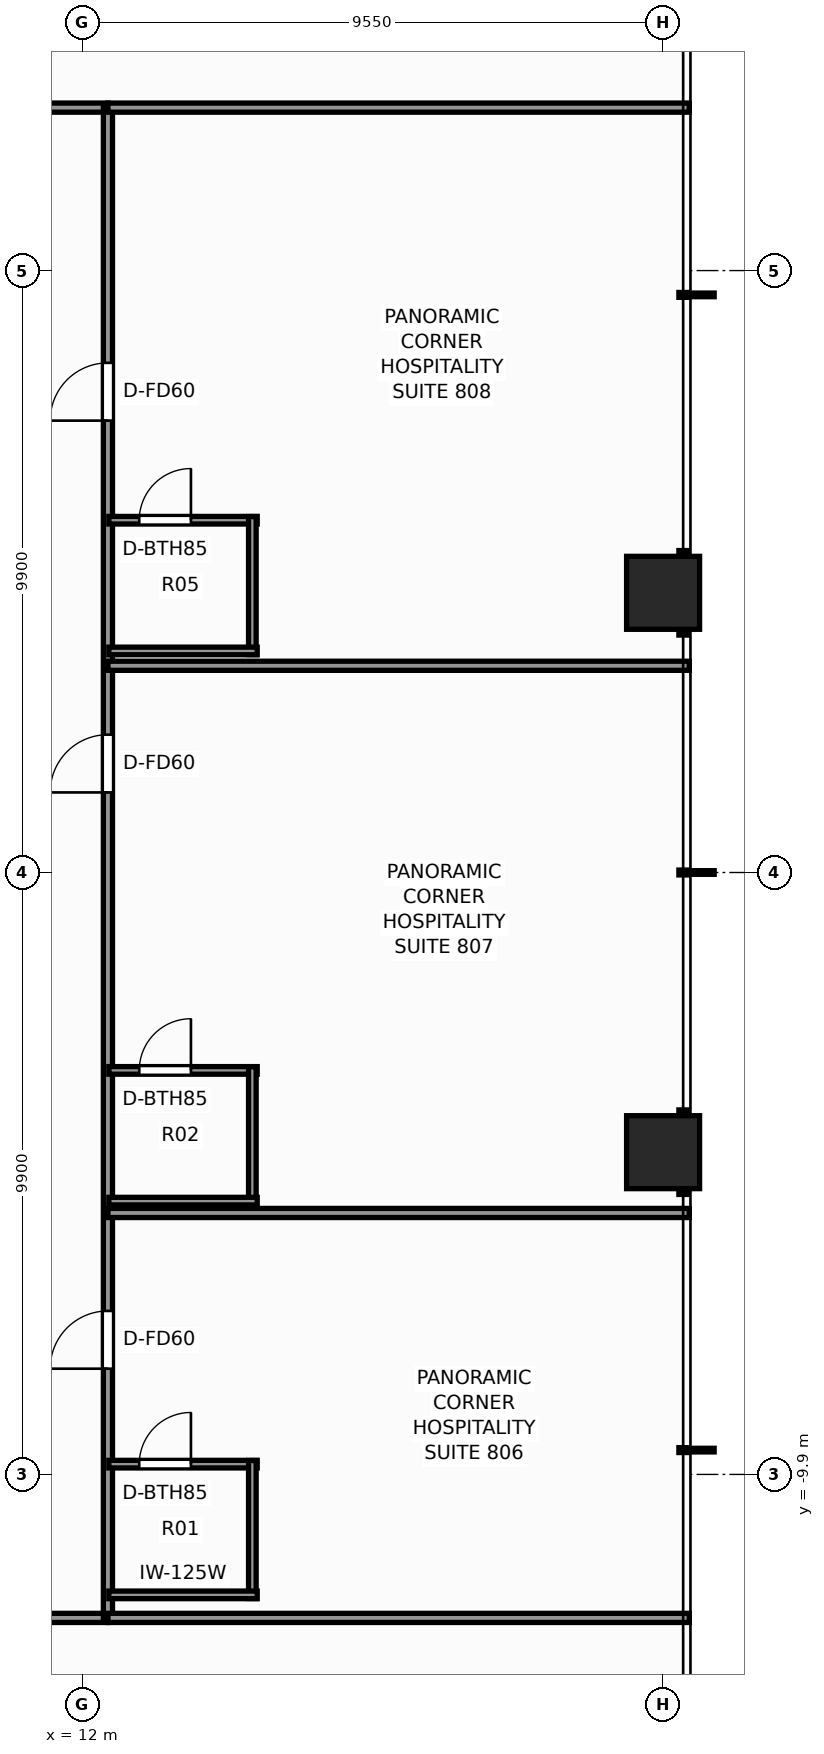
"""IFC4 building model, lengths in metres.
Left out: names, types, materials, properties, quantities, classifications, styles, units other than length and angle.
Written with IfcOpenShell. Run it as: python <this file> out.ifc"""

import sys

from ifc_helpers import new_model, si_unit, direction, frame, frame_2d, origin, origin_2d, place, context, subcontext, project, spatial, rectangle, extrude, element, fill, save


model = new_model("IFC4")
c1 = context("Model", 3, precision=1e-05, world=origin(), true_north=direction((0.0, 1.0)))
c2 = subcontext(c1, "Body", "Model", "MODEL_VIEW")
j1 = project(units=[si_unit("LENGTHUNIT", "METRE"), si_unit("PLANEANGLEUNIT", "RADIAN")], contexts=[c1])
p1 = place(None, origin())
s1 = spatial("IfcSite", under=j1, at=p1, CompositionType="ELEMENT")
p2 = place(p1, origin())
s2 = spatial("IfcBuilding", under=s1, at=p2, CompositionType="ELEMENT")
p3 = place(p2, frame((0.0, 0.0, 30.4)))
s3 = spatial("IfcBuildingStorey", under=s2, at=p3, CompositionType="ELEMENT", Elevation=30.4)
for number, where, z_axis, x_axis in (
    (1, (21.55, -4.6, 0.0), (0.0, 0.0, 1.0), (1.0, 0.0, 0.0)),
    (2, (21.55, 4.6, 0.0), (0.0, 0.0, 1.0), (1.0, 0.0, 0.0)),
):
    element("IfcColumn", number, at=place(p3, frame(where, z_axis=z_axis, x_axis=x_axis)), inside=s3, PredefinedType="COLUMN", context=c2, shape_type="SweptSolid", body=[
        extrude(rectangle(XDim=1.2, YDim=1.2, at=origin_2d()), origin(), (0.0, 0.0, 1.0), 3.3),
    ])
p4 = place(p3, frame((-12.26, -12.26, 0.0), z_axis=(0.0, 0.0, 1.0), x_axis=(1.0, 0.0, 0.0)))
e3 = element("IfcWall", 3, at=p4, inside=s3, PredefinedType="PARTITIONING", context=c2, shape_type="SweptSolid", body=[
    extrude(rectangle(XDim=24.68, YDim=0.15, at=frame_2d((12.34, 0.0))), origin(), (0.0, 0.0, 1.0), 2.272),
])
p5 = place(p4, frame((3.444, 0.0, 0.0)))
e4 = element("IfcOpeningElement", 4, at=p5, cuts=e3, PredefinedType="OPENING", context=c2, shape_type="SweptSolid", body=[
    extrude(rectangle(XDim=0.9, YDim=2.06, at=frame_2d((0.45, 1.03))), frame((0.0, 0.085, 0.0), z_axis=(0.0, -1.0, 0.0), x_axis=(1.0, 0.0, 0.0)), (0.0, 0.0, 1.0), 0.17),
])
p6 = place(p4, frame((5.779, 0.0, 0.0)))
e5 = element("IfcOpeningElement", 5, at=p6, cuts=e3, PredefinedType="OPENING", context=c2, shape_type="SweptSolid", body=[
    extrude(rectangle(XDim=0.9, YDim=2.06, at=frame_2d((0.45, 1.03))), frame((0.0, 0.085, 0.0), z_axis=(0.0, -1.0, 0.0), x_axis=(1.0, 0.0, 0.0)), (0.0, 0.0, 1.0), 0.17),
])
p7 = place(p4, frame((13.551, 0.0, 0.0)))
e6 = element("IfcOpeningElement", 6, at=p7, cuts=e3, PredefinedType="OPENING", context=c2, shape_type="SweptSolid", body=[
    extrude(rectangle(XDim=0.9, YDim=2.06, at=frame_2d((0.45, 1.03))), frame((0.0, 0.085, 0.0), z_axis=(0.0, -1.0, 0.0), x_axis=(1.0, 0.0, 0.0)), (0.0, 0.0, 1.0), 0.17),
])
p8 = place(p4, frame((17.921, 0.0, 0.0)))
e7 = element("IfcOpeningElement", 7, at=p8, cuts=e3, PredefinedType="OPENING", context=c2, shape_type="SweptSolid", body=[
    extrude(rectangle(XDim=0.9, YDim=2.06, at=frame_2d((0.45, 1.03))), frame((0.0, 0.085, 0.0), z_axis=(0.0, -1.0, 0.0), x_axis=(1.0, 0.0, 0.0)), (0.0, 0.0, 1.0), 0.17),
])
p9 = place(p4, frame((20.256, 0.0, 0.0)))
e8 = element("IfcOpeningElement", 8, at=p9, cuts=e3, PredefinedType="OPENING", context=c2, shape_type="SweptSolid", body=[
    extrude(rectangle(XDim=0.9, YDim=2.06, at=frame_2d((0.45, 1.03))), frame((0.0, 0.085, 0.0), z_axis=(0.0, -1.0, 0.0), x_axis=(1.0, 0.0, 0.0)), (0.0, 0.0, 1.0), 0.17),
])
p10 = place(p3, frame((-12.26, 12.58, 0.0), z_axis=(0.0, 0.0, 1.0), x_axis=(1.0, 0.0, 0.0)))
e9 = element("IfcWall", 9, at=p10, inside=s3, PredefinedType="PARTITIONING", context=c2, shape_type="SweptSolid", body=[
    extrude(rectangle(XDim=24.68, YDim=0.15, at=frame_2d((12.34, 0.0))), origin(), (0.0, 0.0, 1.0), 2.272),
])
p11 = place(p10, frame((3.444, 0.0, 0.0)))
e10 = element("IfcOpeningElement", 10, at=p11, cuts=e9, PredefinedType="OPENING", context=c2, shape_type="SweptSolid", body=[
    extrude(rectangle(XDim=0.9, YDim=2.06, at=frame_2d((0.45, 1.03))), frame((0.0, 0.085, 0.0), z_axis=(0.0, -1.0, 0.0), x_axis=(1.0, 0.0, 0.0)), (0.0, 0.0, 1.0), 0.17),
])
p12 = place(p10, frame((9.78, 0.0, 0.0)))
e11 = element("IfcOpeningElement", 11, at=p12, cuts=e9, PredefinedType="OPENING", context=c2, shape_type="SweptSolid", body=[
    extrude(rectangle(XDim=0.9, YDim=2.06, at=frame_2d((0.45, 1.03))), frame((0.0, 0.085, 0.0), z_axis=(0.0, -1.0, 0.0), x_axis=(1.0, 0.0, 0.0)), (0.0, 0.0, 1.0), 0.17),
])
p13 = place(p10, frame((19.345, 0.0, 0.0)))
e12 = element("IfcOpeningElement", 12, at=p13, cuts=e9, PredefinedType="OPENING", context=c2, shape_type="SweptSolid", body=[
    extrude(rectangle(XDim=0.9, YDim=2.06, at=frame_2d((0.45, 1.03))), frame((0.0, 0.085, 0.0), z_axis=(0.0, -1.0, 0.0), x_axis=(1.0, 0.0, 0.0)), (0.0, 0.0, 1.0), 0.17),
])
p14 = place(p3, frame((12.42, -12.26, 0.0), z_axis=(0.0, 0.0, 1.0), x_axis=(0.0, 1.0, 0.0)))
e13 = element("IfcWall", 13, at=p14, inside=s3, PredefinedType="PARTITIONING", context=c2, shape_type="SweptSolid", body=[
    extrude(rectangle(XDim=24.84, YDim=0.15, at=frame_2d((12.42, 0.0))), origin(), (0.0, 0.0, 1.0), 2.272),
])
p15 = place(p14, frame((4.099, 0.0, 0.0)))
e14 = element("IfcOpeningElement", 14, at=p15, cuts=e13, PredefinedType="OPENING", context=c2, shape_type="SweptSolid", body=[
    extrude(rectangle(XDim=0.95, YDim=2.06, at=frame_2d((0.475, 1.03))), frame((0.0, 0.085, 0.0), z_axis=(0.0, -1.0, 0.0), x_axis=(1.0, 0.0, 0.0)), (0.0, 0.0, 1.0), 0.17),
])
p16 = place(p14, frame((13.577, 0.0, 0.0)))
e15 = element("IfcOpeningElement", 15, at=p16, cuts=e13, PredefinedType="OPENING", context=c2, shape_type="SweptSolid", body=[
    extrude(rectangle(XDim=0.95, YDim=2.06, at=frame_2d((0.475, 1.03))), frame((0.0, 0.085, 0.0), z_axis=(0.0, -1.0, 0.0), x_axis=(1.0, 0.0, 0.0)), (0.0, 0.0, 1.0), 0.17),
])
p17 = place(p14, frame((19.692, 0.0, 0.0)))
e16 = element("IfcOpeningElement", 16, at=p17, cuts=e13, PredefinedType="OPENING", context=c2, shape_type="SweptSolid", body=[
    extrude(rectangle(XDim=0.95, YDim=2.06, at=frame_2d((0.475, 1.03))), frame((0.0, 0.085, 0.0), z_axis=(0.0, -1.0, 0.0), x_axis=(1.0, 0.0, 0.0)), (0.0, 0.0, 1.0), 0.17),
])
for number, where, z_axis, x_axis in (
    (17, (12.42, -12.26, 0.0), (0.0, 0.0, 1.0), (1.0, 0.0, 0.0)),
    (18, (12.42, 12.58, 0.0), (0.0, 0.0, 1.0), (1.0, 0.0, 0.0)),
):
    element("IfcWall", number, at=place(p3, frame(where, z_axis=z_axis, x_axis=x_axis)), inside=s3, PredefinedType="PARTITIONING", context=c2, shape_type="SweptSolid", body=[
        extrude(rectangle(XDim=9.56, YDim=0.15, at=frame_2d((4.78, 0.0))), origin(), (0.0, 0.0, 1.0), 2.272),
    ])
p18 = place(p3, frame((12.42, -5.6, 0.0), z_axis=(0.0, 0.0, 1.0), x_axis=(1.0, 0.0, 0.0)))
e19 = element("IfcWall", 19, at=p18, inside=s3, PredefinedType="PARTITIONING", context=c2, shape_type="SweptSolid", body=[
    extrude(rectangle(XDim=9.56, YDim=0.15, at=frame_2d((4.78, 0.0))), origin(), (0.0, 0.0, 1.0), 2.429),
])
p19 = place(p3, frame((12.435, -9.731, 0.0), z_axis=(0.0, 0.0, 1.0), x_axis=(1.0, 0.0, 0.0)))
e20 = element("IfcWall", 20, at=p19, inside=s3, PredefinedType="PARTITIONING", context=c2, shape_type="SweptSolid", body=[
    extrude(rectangle(XDim=2.44, YDim=0.125, at=frame_2d((1.22, 0.0))), origin(), (0.0, 0.0, 1.0), 3.06),
])
p20 = place(p19, frame((0.5, 0.0, 0.0)))
e21 = element("IfcOpeningElement", 21, at=p20, cuts=e20, PredefinedType="OPENING", context=c2, shape_type="SweptSolid", body=[
    extrude(rectangle(XDim=0.85, YDim=2.03, at=frame_2d((0.425, 1.015))), frame((0.0, 0.073, 0.0), z_axis=(0.0, -1.0, 0.0), x_axis=(1.0, 0.0, 0.0)), (0.0, 0.0, 1.0), 0.145),
])
p21 = place(p3, frame((14.795, -11.941, 0.0), z_axis=(0.0, 0.0, 1.0), x_axis=(0.0, 1.0, 0.0)))
e22 = element("IfcWall", 22, at=p21, inside=s3, PredefinedType="PARTITIONING", context=c2, shape_type="SweptSolid", body=[
    extrude(rectangle(XDim=2.27, YDim=0.125, at=frame_2d((1.135, 0.0))), origin(), (0.0, 0.0, 1.0), 2.272),
])
p22 = place(p3, frame((12.435, -11.881, 0.0), z_axis=(0.0, 0.0, 1.0), x_axis=(1.0, 0.0, 0.0)))
e23 = element("IfcWall", 23, at=p22, inside=s3, PredefinedType="PARTITIONING", context=c2, shape_type="SweptSolid", body=[
    extrude(rectangle(XDim=2.44, YDim=0.125, at=frame_2d((1.22, 0.0))), origin(), (0.0, 0.0, 1.0), 2.272),
])
p23 = place(p3, frame((12.42, 3.4, 0.0), z_axis=(0.0, 0.0, 1.0), x_axis=(1.0, 0.0, 0.0)))
e24 = element("IfcWall", 24, at=p23, inside=s3, PredefinedType="PARTITIONING", context=c2, shape_type="SweptSolid", body=[
    extrude(rectangle(XDim=9.56, YDim=0.15, at=frame_2d((4.78, 0.0))), origin(), (0.0, 0.0, 1.0), 2.429),
])
p24 = place(p3, frame((12.435, -3.255, 0.0), z_axis=(0.0, 0.0, 1.0), x_axis=(1.0, 0.0, 0.0)))
e25 = element("IfcWall", 25, at=p24, inside=s3, PredefinedType="PARTITIONING", context=c2, shape_type="SweptSolid", body=[
    extrude(rectangle(XDim=2.44, YDim=0.125, at=frame_2d((1.22, 0.0))), origin(), (0.0, 0.0, 1.0), 2.349),
])
p25 = place(p24, frame((0.5, 0.0, 0.0)))
e26 = element("IfcOpeningElement", 26, at=p25, cuts=e25, PredefinedType="OPENING", context=c2, shape_type="SweptSolid", body=[
    extrude(rectangle(XDim=0.85, YDim=2.03, at=frame_2d((0.425, 1.015))), frame((0.0, 0.073, 0.0), z_axis=(0.0, -1.0, 0.0), x_axis=(1.0, 0.0, 0.0)), (0.0, 0.0, 1.0), 0.145),
])
p26 = place(p3, frame((14.795, -5.465, 0.0), z_axis=(0.0, 0.0, 1.0), x_axis=(0.0, 1.0, 0.0)))
e27 = element("IfcWall", 27, at=p26, inside=s3, PredefinedType="PARTITIONING", context=c2, shape_type="SweptSolid", body=[
    extrude(rectangle(XDim=2.27, YDim=0.125, at=frame_2d((1.135, 0.0))), origin(), (0.0, 0.0, 1.0), 2.272),
])
p27 = place(p3, frame((12.435, -5.405, 0.0), z_axis=(0.0, 0.0, 1.0), x_axis=(1.0, 0.0, 0.0)))
e28 = element("IfcWall", 28, at=p27, inside=s3, PredefinedType="PARTITIONING", context=c2, shape_type="SweptSolid", body=[
    extrude(rectangle(XDim=2.44, YDim=0.125, at=frame_2d((1.22, 0.0))), origin(), (0.0, 0.0, 1.0), 3.06),
])
p28 = place(p3, frame((12.435, 5.794, 0.0), z_axis=(0.0, 0.0, 1.0), x_axis=(1.0, 0.0, 0.0)))
e29 = element("IfcWall", 29, at=p28, inside=s3, PredefinedType="PARTITIONING", context=c2, shape_type="SweptSolid", body=[
    extrude(rectangle(XDim=2.44, YDim=0.125, at=frame_2d((1.22, 0.0))), origin(), (0.0, 0.0, 1.0), 3.06),
])
p29 = place(p28, frame((0.5, 0.0, 0.0)))
e30 = element("IfcOpeningElement", 30, at=p29, cuts=e29, PredefinedType="OPENING", context=c2, shape_type="SweptSolid", body=[
    extrude(rectangle(XDim=0.85, YDim=2.03, at=frame_2d((0.425, 1.015))), frame((0.0, 0.073, 0.0), z_axis=(0.0, -1.0, 0.0), x_axis=(1.0, 0.0, 0.0)), (0.0, 0.0, 1.0), 0.145),
])
p30 = place(p3, frame((14.795, 3.584, 0.0), z_axis=(0.0, 0.0, 1.0), x_axis=(0.0, 1.0, 0.0)))
e31 = element("IfcWall", 31, at=p30, inside=s3, PredefinedType="PARTITIONING", context=c2, shape_type="SweptSolid", body=[
    extrude(rectangle(XDim=2.27, YDim=0.125, at=frame_2d((1.135, 0.0))), origin(), (0.0, 0.0, 1.0), 2.272),
])
p31 = place(p3, frame((12.435, 3.644, 0.0), z_axis=(0.0, 0.0, 1.0), x_axis=(1.0, 0.0, 0.0)))
e32 = element("IfcWall", 32, at=p31, inside=s3, PredefinedType="PARTITIONING", context=c2, shape_type="SweptSolid", body=[
    extrude(rectangle(XDim=2.44, YDim=0.125, at=frame_2d((1.22, 0.0))), origin(), (0.0, 0.0, 1.0), 3.06),
])
p32 = place(p20, origin())
e33 = element("IfcDoor", 33, at=p32, inside=s3, OperationType="SINGLE_SWING_RIGHT", PredefinedType="DOOR", context=c2, shape_type="SweptSolid", body=[
    extrude(rectangle(XDim=0.85, YDim=2.03, at=frame_2d((0.425, 1.015))), frame((0.0, 0.025, 0.0), z_axis=(0.0, -1.0, 0.0), x_axis=(1.0, 0.0, 0.0)), (0.0, 0.0, 1.0), 0.05),
])
fill(e21, e33)
p33 = place(p15, origin())
e34 = element("IfcDoor", 34, at=p33, inside=s3, OperationType="SINGLE_SWING_LEFT", PredefinedType="DOOR", context=c2, shape_type="SweptSolid", body=[
    extrude(rectangle(XDim=0.95, YDim=2.06, at=frame_2d((0.475, 1.03))), frame((0.0, 0.025, 0.0), z_axis=(0.0, -1.0, 0.0), x_axis=(1.0, 0.0, 0.0)), (0.0, 0.0, 1.0), 0.05),
])
fill(e14, e34)
p34 = place(p25, origin())
e35 = element("IfcDoor", 35, at=p34, inside=s3, OperationType="SINGLE_SWING_RIGHT", PredefinedType="DOOR", context=c2, shape_type="SweptSolid", body=[
    extrude(rectangle(XDim=0.85, YDim=2.03, at=frame_2d((0.425, 1.015))), frame((0.0, 0.025, 0.0), z_axis=(0.0, -1.0, 0.0), x_axis=(1.0, 0.0, 0.0)), (0.0, 0.0, 1.0), 0.05),
])
fill(e26, e35)
p35 = place(p16, origin())
e36 = element("IfcDoor", 36, at=p35, inside=s3, OperationType="SINGLE_SWING_LEFT", PredefinedType="DOOR", context=c2, shape_type="SweptSolid", body=[
    extrude(rectangle(XDim=0.95, YDim=2.06, at=frame_2d((0.475, 1.03))), frame((0.0, 0.025, 0.0), z_axis=(0.0, -1.0, 0.0), x_axis=(1.0, 0.0, 0.0)), (0.0, 0.0, 1.0), 0.05),
])
fill(e15, e36)
p36 = place(p29, origin())
e37 = element("IfcDoor", 37, at=p36, inside=s3, OperationType="SINGLE_SWING_RIGHT", PredefinedType="DOOR", context=c2, shape_type="SweptSolid", body=[
    extrude(rectangle(XDim=0.85, YDim=2.03, at=frame_2d((0.425, 1.015))), frame((0.0, 0.025, 0.0), z_axis=(0.0, -1.0, 0.0), x_axis=(1.0, 0.0, 0.0)), (0.0, 0.0, 1.0), 0.05),
])
fill(e30, e37)
p37 = place(p17, origin())
e38 = element("IfcDoor", 38, at=p37, inside=s3, OperationType="SINGLE_SWING_LEFT", PredefinedType="DOOR", context=c2, shape_type="SweptSolid", body=[
    extrude(rectangle(XDim=0.95, YDim=2.06, at=frame_2d((0.475, 1.03))), frame((0.0, 0.025, 0.0), z_axis=(0.0, -1.0, 0.0), x_axis=(1.0, 0.0, 0.0)), (0.0, 0.0, 1.0), 0.05),
])
fill(e16, e38)
save(model, sys.argv[1])
